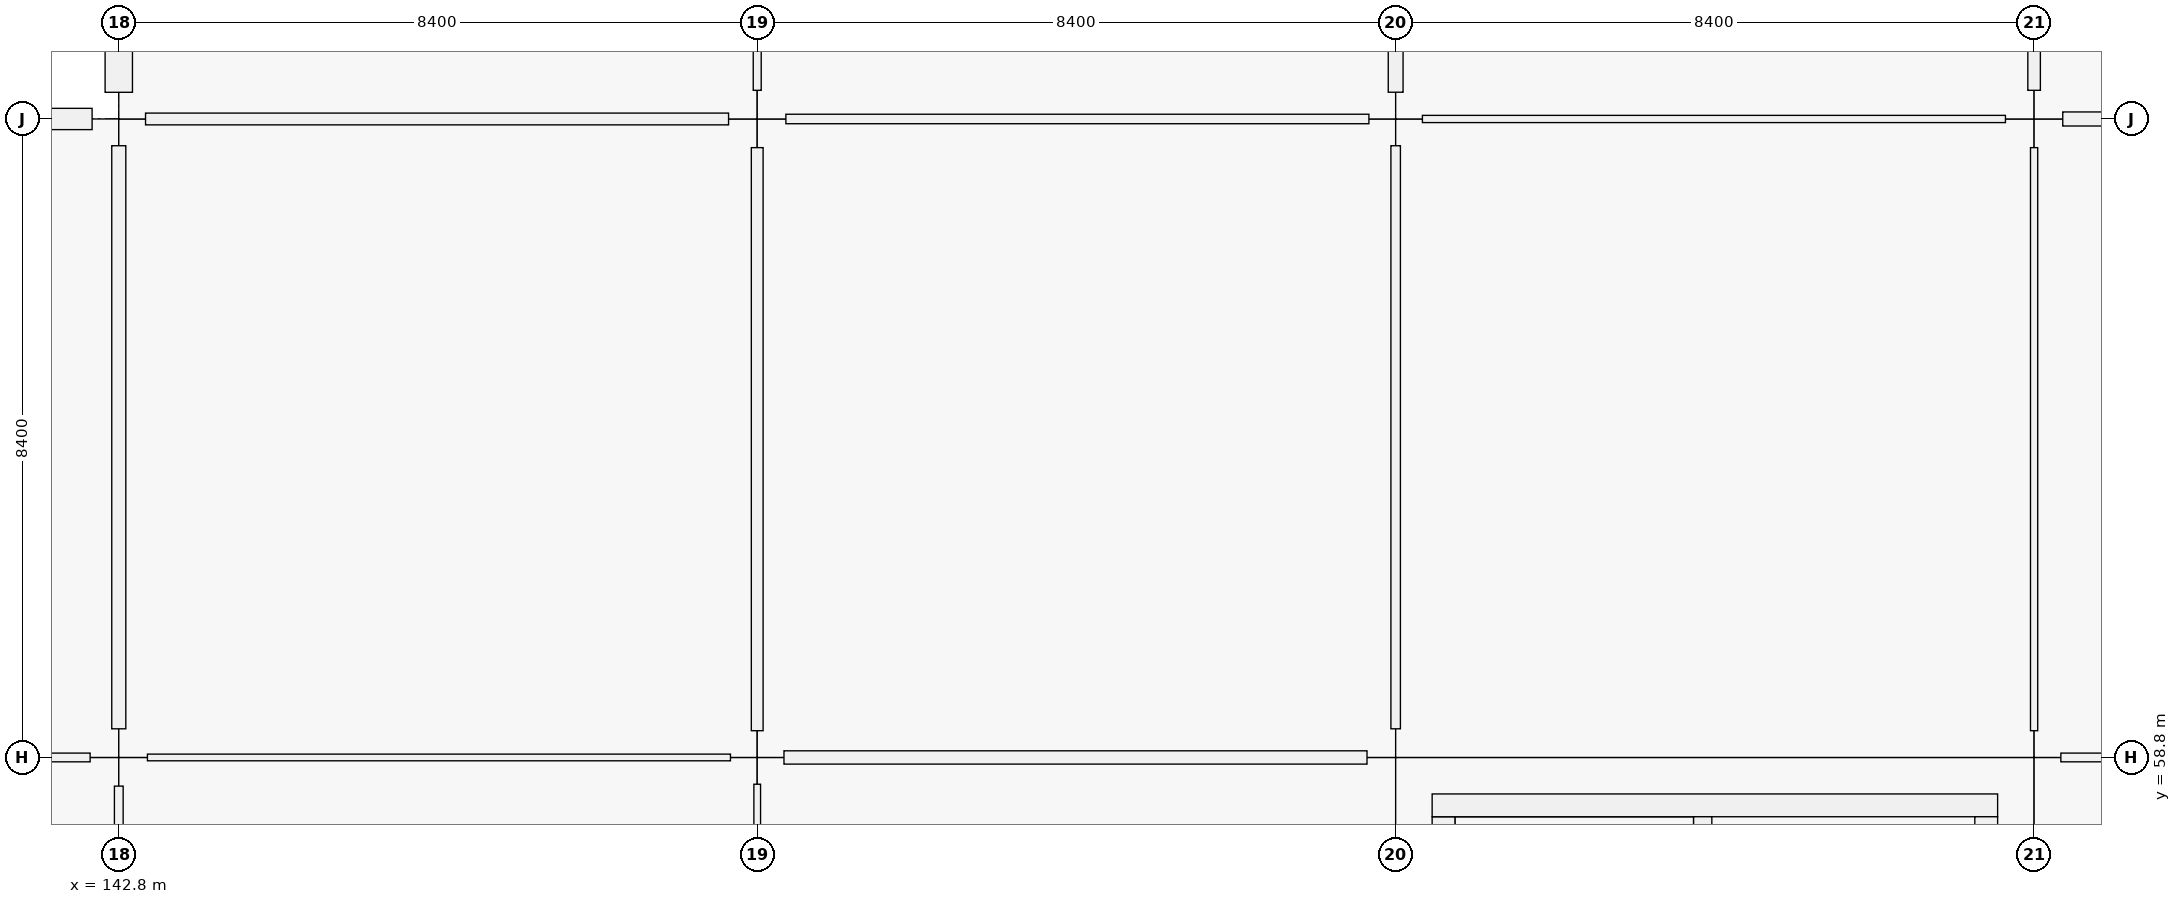
"""IFC4 building model, lengths in metres.
Left out: names, types, materials, properties, quantities, classifications, styles, units other than length and angle.
Written with IfcOpenShell. Run it as: python <this file> out.ifc"""

import sys

from ifc_helpers import new_model, si_unit, direction, frame, frame_2d, origin, origin_2d, place, context, subcontext, project, spatial, rectangle, extrude, element, fill, save


model = new_model("IFC4")
c1 = context("Model", 3, precision=1e-05, world=origin(), true_north=direction((0.0, 1.0)))
c2 = subcontext(c1, "Body", "Model", "MODEL_VIEW")
j1 = project(units=[si_unit("LENGTHUNIT", "METRE"), si_unit("PLANEANGLEUNIT", "RADIAN")], contexts=[c1])
p1 = place(None, origin())
s1 = spatial("IfcSite", under=j1, at=p1, CompositionType="ELEMENT")
p2 = place(p1, origin())
s2 = spatial("IfcBuilding", under=s1, at=p2, CompositionType="ELEMENT")
p3 = place(p2, frame((0.0, 0.0, 5.76)))
s3 = spatial("IfcBuildingStorey", under=s2, at=p3, CompositionType="ELEMENT", Elevation=5.76)
p4 = place(p3, frame((142.8, 58.8, 0.0), z_axis=(0.0, 0.0, 1.0), x_axis=(1.0, 0.0, 0.0)))
e1 = element("IfcColumn", 1, at=p4, inside=s3, PredefinedType="COLUMN", context=c2, shape_type="SweptSolid", body=[
    extrude(rectangle(XDim=0.75, YDim=0.75, at=origin_2d()), origin(), (0.0, 0.0, 1.0), 4.5),
])
for number, where, z_axis, x_axis in (
    (2, (142.8, 67.2, 0.0), (0.0, 0.0, 1.0), (1.0, 0.0, 0.0)),
    (3, (151.2, 58.8, 0.0), (0.0, 0.0, 1.0), (1.0, 0.0, 0.0)),
):
    element("IfcColumn", number, at=place(p3, frame(where, z_axis=z_axis, x_axis=x_axis)), inside=s3, PredefinedType="COLUMN", context=c2, shape_type="SweptSolid", body=[
        extrude(rectangle(XDim=0.7, YDim=0.7, at=origin_2d()), origin(), (0.0, 0.0, 1.0), 4.5),
    ])
for number, where, z_axis, x_axis in (
    (4, (151.2, 67.2, 0.0), (0.0, 0.0, 1.0), (1.0, 0.0, 0.0)),
    (5, (159.6, 58.8, 0.0), (0.0, 0.0, 1.0), (1.0, 0.0, 0.0)),
):
    element("IfcColumn", number, at=place(p3, frame(where, z_axis=z_axis, x_axis=x_axis)), inside=s3, PredefinedType="COLUMN", context=c2, shape_type="SweptSolid", body=[
        extrude(rectangle(XDim=0.75, YDim=0.75, at=origin_2d()), origin(), (0.0, 0.0, 1.0), 4.5),
    ])
for number, where, z_axis, x_axis in (
    (6, (159.6, 67.2, 0.0), (0.0, 0.0, 1.0), (1.0, 0.0, 0.0)),
    (7, (168.0, 58.8, 0.0), (0.0, 0.0, 1.0), (1.0, 0.0, 0.0)),
):
    element("IfcColumn", number, at=place(p3, frame(where, z_axis=z_axis, x_axis=x_axis)), inside=s3, PredefinedType="COLUMN", context=c2, shape_type="SweptSolid", body=[
        extrude(rectangle(XDim=0.7, YDim=0.7, at=origin_2d()), origin(), (0.0, 0.0, 1.0), 4.5),
    ])
p5 = place(p3, frame((168.0, 67.2, 0.0), z_axis=(0.0, 0.0, 1.0), x_axis=(1.0, 0.0, 0.0)))
e8 = element("IfcColumn", 8, at=p5, inside=s3, PredefinedType="COLUMN", context=c2, shape_type="SweptSolid", body=[
    extrude(rectangle(XDim=0.75, YDim=0.75, at=origin_2d()), origin(), (0.0, 0.0, 1.0), 4.5),
])
p6 = place(p3, frame((134.726, 67.2, 0.0), z_axis=(0.0, 0.0, 1.0), x_axis=(1.0, 0.0, 0.0)))
e9 = element("IfcWall", 9, at=p6, inside=s3, PredefinedType="SOLIDWALL", context=c2, shape_type="SweptSolid", body=[
    extrude(rectangle(XDim=7.723, YDim=0.28, at=frame_2d((3.861, 0.0))), origin(), (0.0, 0.0, 1.0), 3.4),
])
p7 = place(p6, frame((2.662, 0.0, 0.9)))
e10 = element("IfcOpeningElement", 10, at=p7, cuts=e9, PredefinedType="OPENING", context=c2, shape_type="SweptSolid", body=[
    extrude(rectangle(XDim=2.4, YDim=2.25, at=frame_2d((1.2, 1.125))), frame((0.0, 0.14, 0.0), z_axis=(0.0, -1.0, 0.0), x_axis=(1.0, 0.0, 0.0)), (0.0, 0.0, 1.0), 0.28),
])
p8 = place(p3, frame((142.8, 67.551, 0.0), z_axis=(0.0, 0.0, 1.0), x_axis=(0.0, 1.0, 0.0)))
e11 = element("IfcWall", 11, at=p8, inside=s3, PredefinedType="SOLIDWALL", context=c2, shape_type="SweptSolid", body=[
    extrude(rectangle(XDim=7.773, YDim=0.36, at=frame_2d((3.886, 0.0))), origin(), (0.0, 0.0, 1.0), 3.4),
])
p9 = place(p8, frame((3.036, 0.0, 0.9)))
e12 = element("IfcOpeningElement", 12, at=p9, cuts=e11, PredefinedType="OPENING", context=c2, shape_type="SweptSolid", body=[
    extrude(rectangle(XDim=1.7, YDim=1.85, at=frame_2d((0.85, 0.925))), frame((0.0, 0.18, 0.0), z_axis=(0.0, -1.0, 0.0), x_axis=(1.0, 0.0, 0.0)), (0.0, 0.0, 1.0), 0.36),
])
p10 = place(p3, frame((160.23, 51.18, 0.0), z_axis=(0.0, 0.0, 1.0), x_axis=(0.0, 1.0, 0.0)))
e13 = element("IfcWall", 13, at=p10, inside=s3, PredefinedType="SHEAR", context=c2, shape_type="SweptSolid", body=[
    extrude(rectangle(XDim=6.84, YDim=0.3, at=frame_2d((3.42, 0.0))), origin(), (0.0, 0.0, 1.0), 4.5),
])
p11 = place(p3, frame((160.08, 58.17, 0.0), z_axis=(0.0, 0.0, 1.0), x_axis=(1.0, 0.0, 0.0)))
e14 = element("IfcWall", 14, at=p11, inside=s3, PredefinedType="SHEAR", context=c2, shape_type="SweptSolid", body=[
    extrude(rectangle(XDim=7.44, YDim=0.3, at=frame_2d((3.72, 0.0))), origin(), (0.0, 0.0, 1.0), 4.5),
])
p12 = place(p3, frame((167.37, 58.02, 0.0), z_axis=(0.0, 0.0, 1.0), x_axis=(0.0, -1.0, 0.0)))
e15 = element("IfcWall", 15, at=p12, inside=s3, PredefinedType="SHEAR", context=c2, shape_type="SweptSolid", body=[
    extrude(rectangle(XDim=6.84, YDim=0.3, at=frame_2d((3.42, 0.0))), origin(), (0.0, 0.0, 1.0), 4.5),
])
p13 = place(p3, frame((163.64, 51.18, 0.0), z_axis=(0.0, 0.0, 1.0), x_axis=(0.0, 1.0, 0.0)))
e16 = element("IfcWall", 16, at=p13, inside=s3, PredefinedType="SHEAR", context=c2, shape_type="SweptSolid", body=[
    extrude(rectangle(XDim=6.84, YDim=0.24, at=frame_2d((3.42, 0.0))), origin(), (0.0, 0.0, 1.0), 4.5),
])
p14 = place(p13, frame((0.12, 0.0, 0.0)))
e17 = element("IfcOpeningElement", 17, at=p14, cuts=e16, PredefinedType="OPENING", context=c2, shape_type="SweptSolid", body=[
    extrude(rectangle(XDim=1.0, YDim=2.15, at=frame_2d((0.5, 1.075))), frame((0.0, 0.12, 0.0), z_axis=(0.0, -1.0, 0.0), x_axis=(1.0, 0.0, 0.0)), (0.0, 0.0, 1.0), 0.24),
])
p15 = place(p3, frame((134.752, 58.8, 0.0), z_axis=(0.0, 0.0, 1.0), x_axis=(1.0, 0.0, 0.0)))
e18 = element("IfcWall", 18, at=p15, inside=s3, PredefinedType="PARTITIONING", context=c2, shape_type="SweptSolid", body=[
    extrude(rectangle(XDim=7.671, YDim=0.115, at=frame_2d((3.835, 0.0))), origin(), (0.0, 0.0, 1.0), 2.4),
])
p16 = place(p15, frame((3.356, 0.0, 0.0)))
e19 = element("IfcOpeningElement", 19, at=p16, cuts=e18, PredefinedType="OPENING", context=c2, shape_type="SweptSolid", body=[
    extrude(rectangle(XDim=0.96, YDim=2.18, at=frame_2d((0.48, 1.09))), frame((0.0, 0.058, 0.0), z_axis=(0.0, -1.0, 0.0), x_axis=(1.0, 0.0, 0.0)), (0.0, 0.0, 1.0), 0.115),
])
p17 = place(p3, frame((143.177, 58.8, 0.0), z_axis=(0.0, 0.0, 1.0), x_axis=(1.0, 0.0, 0.0)))
e20 = element("IfcWall", 20, at=p17, inside=s3, PredefinedType="PARTITIONING", context=c2, shape_type="SweptSolid", body=[
    extrude(rectangle(XDim=7.671, YDim=0.088, at=frame_2d((3.835, 0.0))), origin(), (0.0, 0.0, 1.0), 2.4),
])
p18 = place(p3, frame((143.152, 67.2, 0.0), z_axis=(0.0, 0.0, 1.0), x_axis=(1.0, 0.0, 0.0)))
e21 = element("IfcWall", 21, at=p18, inside=s3, PredefinedType="PARTITIONING", context=c2, shape_type="SweptSolid", body=[
    extrude(rectangle(XDim=7.671, YDim=0.155, at=frame_2d((3.835, 0.0))), origin(), (0.0, 0.0, 1.0), 2.4),
])
p19 = place(p18, frame((3.336, 0.0, 0.0)))
e22 = element("IfcOpeningElement", 22, at=p19, cuts=e21, PredefinedType="OPENING", context=c2, shape_type="SweptSolid", body=[
    extrude(rectangle(XDim=1.0, YDim=2.2, at=frame_2d((0.5, 1.1))), frame((0.0, 0.078, 0.0), z_axis=(0.0, -1.0, 0.0), x_axis=(1.0, 0.0, 0.0)), (0.0, 0.0, 1.0), 0.155),
])
p20 = place(p3, frame((151.552, 58.8, 0.0), z_axis=(0.0, 0.0, 1.0), x_axis=(1.0, 0.0, 0.0)))
e23 = element("IfcWall", 23, at=p20, inside=s3, PredefinedType="PARTITIONING", context=c2, shape_type="SweptSolid", body=[
    extrude(rectangle(XDim=7.671, YDim=0.175, at=frame_2d((3.835, 0.0))), origin(), (0.0, 0.0, 1.0), 2.4),
])
p21 = place(p20, frame((3.376, 0.0, 0.0)))
e24 = element("IfcOpeningElement", 24, at=p21, cuts=e23, PredefinedType="OPENING", context=c2, shape_type="SweptSolid", body=[
    extrude(rectangle(XDim=0.92, YDim=2.15, at=frame_2d((0.46, 1.075))), frame((0.0, 0.087, 0.0), z_axis=(0.0, -1.0, 0.0), x_axis=(1.0, 0.0, 0.0)), (0.0, 0.0, 1.0), 0.175),
])
p22 = place(p3, frame((151.577, 67.2, 0.0), z_axis=(0.0, 0.0, 1.0), x_axis=(1.0, 0.0, 0.0)))
e25 = element("IfcWall", 25, at=p22, inside=s3, PredefinedType="PARTITIONING", context=c2, shape_type="SweptSolid", body=[
    extrude(rectangle(XDim=7.671, YDim=0.125, at=frame_2d((3.835, 0.0))), origin(), (0.0, 0.0, 1.0), 2.4),
])
p23 = place(p22, frame((3.311, 0.0, 0.0)))
e26 = element("IfcOpeningElement", 26, at=p23, cuts=e25, PredefinedType="OPENING", context=c2, shape_type="SweptSolid", body=[
    extrude(rectangle(XDim=1.05, YDim=2.12, at=frame_2d((0.525, 1.06))), frame((0.0, 0.062, 0.0), z_axis=(0.0, -1.0, 0.0), x_axis=(1.0, 0.0, 0.0)), (0.0, 0.0, 1.0), 0.125),
])
p24 = place(p3, frame((159.952, 67.2, 0.0), z_axis=(0.0, 0.0, 1.0), x_axis=(1.0, 0.0, 0.0)))
e27 = element("IfcWall", 27, at=p24, inside=s3, PredefinedType="PARTITIONING", context=c2, shape_type="SweptSolid", body=[
    extrude(rectangle(XDim=7.671, YDim=0.095, at=frame_2d((3.835, 0.0))), origin(), (0.0, 0.0, 1.0), 2.4),
])
p25 = place(p24, frame((3.351, 0.0, 0.0)))
e28 = element("IfcOpeningElement", 28, at=p25, cuts=e27, PredefinedType="OPENING", context=c2, shape_type="SweptSolid", body=[
    extrude(rectangle(XDim=0.97, YDim=2.12, at=frame_2d((0.485, 1.06))), frame((0.0, 0.047, 0.0), z_axis=(0.0, -1.0, 0.0), x_axis=(1.0, 0.0, 0.0)), (0.0, 0.0, 1.0), 0.095),
])
p26 = place(p3, frame((168.352, 58.8, 0.0), z_axis=(0.0, 0.0, 1.0), x_axis=(1.0, 0.0, 0.0)))
e29 = element("IfcWall", 29, at=p26, inside=s3, PredefinedType="PARTITIONING", context=c2, shape_type="SweptSolid", body=[
    extrude(rectangle(XDim=7.771, YDim=0.115, at=frame_2d((3.885, 0.0))), origin(), (0.0, 0.0, 1.0), 2.4),
])
p27 = place(p26, frame((3.385, 0.0, 0.0)))
e30 = element("IfcOpeningElement", 30, at=p27, cuts=e29, PredefinedType="OPENING", context=c2, shape_type="SweptSolid", body=[
    extrude(rectangle(XDim=1.0, YDim=2.2, at=frame_2d((0.5, 1.1))), frame((0.0, 0.058, 0.0), z_axis=(0.0, -1.0, 0.0), x_axis=(1.0, 0.0, 0.0)), (0.0, 0.0, 1.0), 0.115),
])
p28 = place(p3, frame((168.377, 67.2, 0.0), z_axis=(0.0, 0.0, 1.0), x_axis=(1.0, 0.0, 0.0)))
e31 = element("IfcWall", 31, at=p28, inside=s3, PredefinedType="PARTITIONING", context=c2, shape_type="SweptSolid", body=[
    extrude(rectangle(XDim=7.746, YDim=0.185, at=frame_2d((3.873, 0.0))), origin(), (0.0, 0.0, 1.0), 2.4),
])
p29 = place(p28, frame((3.383, 0.0, 0.0)))
e32 = element("IfcOpeningElement", 32, at=p29, cuts=e31, PredefinedType="OPENING", context=c2, shape_type="SweptSolid", body=[
    extrude(rectangle(XDim=0.98, YDim=2.18, at=frame_2d((0.49, 1.09))), frame((0.0, 0.093, 0.0), z_axis=(0.0, -1.0, 0.0), x_axis=(1.0, 0.0, 0.0)), (0.0, 0.0, 1.0), 0.185),
])
p30 = place(p3, frame((142.8, 50.752, 0.0), z_axis=(0.0, 0.0, 1.0), x_axis=(0.0, 1.0, 0.0)))
e33 = element("IfcWall", 33, at=p30, inside=s3, PredefinedType="PARTITIONING", context=c2, shape_type="SweptSolid", body=[
    extrude(rectangle(XDim=7.671, YDim=0.115, at=frame_2d((3.835, 0.0))), origin(), (0.0, 0.0, 1.0), 2.4),
])
p31 = place(p30, frame((0.623, 0.0, 0.0)))
e34 = element("IfcOpeningElement", 34, at=p31, cuts=e33, PredefinedType="OPENING", context=c2, shape_type="SweptSolid", body=[
    extrude(rectangle(XDim=0.98, YDim=2.08, at=frame_2d((0.49, 1.04))), frame((0.0, 0.058, 0.0), z_axis=(0.0, -1.0, 0.0), x_axis=(1.0, 0.0, 0.0)), (0.0, 0.0, 1.0), 0.115),
])
p32 = place(p30, frame((4.563, 0.0, 0.0)))
e35 = element("IfcOpeningElement", 35, at=p32, cuts=e33, PredefinedType="OPENING", context=c2, shape_type="SweptSolid", body=[
    extrude(rectangle(XDim=0.94, YDim=2.08, at=frame_2d((0.47, 1.04))), frame((0.0, 0.058, 0.0), z_axis=(0.0, -1.0, 0.0), x_axis=(1.0, 0.0, 0.0)), (0.0, 0.0, 1.0), 0.115),
])
p33 = place(p3, frame((142.8, 59.177, 0.0), z_axis=(0.0, 0.0, 1.0), x_axis=(0.0, 1.0, 0.0)))
e36 = element("IfcWall", 36, at=p33, inside=s3, PredefinedType="PARTITIONING", context=c2, shape_type="SweptSolid", body=[
    extrude(rectangle(XDim=7.671, YDim=0.185, at=frame_2d((3.835, 0.0))), origin(), (0.0, 0.0, 1.0), 2.4),
])
p34 = place(p33, frame((3.376, 0.0, 0.0)))
e37 = element("IfcOpeningElement", 37, at=p34, cuts=e36, PredefinedType="OPENING", context=c2, shape_type="SweptSolid", body=[
    extrude(rectangle(XDim=0.92, YDim=2.15, at=frame_2d((0.46, 1.075))), frame((0.0, 0.093, 0.0), z_axis=(0.0, -1.0, 0.0), x_axis=(1.0, 0.0, 0.0)), (0.0, 0.0, 1.0), 0.185),
])
p35 = place(p3, frame((151.2, 50.777, 0.0), z_axis=(0.0, 0.0, 1.0), x_axis=(0.0, 1.0, 0.0)))
e38 = element("IfcWall", 38, at=p35, inside=s3, PredefinedType="PARTITIONING", context=c2, shape_type="SweptSolid", body=[
    extrude(rectangle(XDim=7.671, YDim=0.088, at=frame_2d((3.835, 0.0))), origin(), (0.0, 0.0, 1.0), 2.4),
])
p36 = place(p3, frame((151.2, 59.152, 0.0), z_axis=(0.0, 0.0, 1.0), x_axis=(0.0, 1.0, 0.0)))
e39 = element("IfcWall", 39, at=p36, inside=s3, PredefinedType="PARTITIONING", context=c2, shape_type="SweptSolid", body=[
    extrude(rectangle(XDim=7.671, YDim=0.155, at=frame_2d((3.835, 0.0))), origin(), (0.0, 0.0, 1.0), 2.4),
])
p37 = place(p36, frame((3.331, 0.0, 0.0)))
e40 = element("IfcOpeningElement", 40, at=p37, cuts=e39, PredefinedType="OPENING", context=c2, shape_type="SweptSolid", body=[
    extrude(rectangle(XDim=1.01, YDim=2.12, at=frame_2d((0.505, 1.06))), frame((0.0, 0.078, 0.0), z_axis=(0.0, -1.0, 0.0), x_axis=(1.0, 0.0, 0.0)), (0.0, 0.0, 1.0), 0.155),
])
p38 = place(p3, frame((151.2, 67.577, 0.0), z_axis=(0.0, 0.0, 1.0), x_axis=(0.0, 1.0, 0.0)))
e41 = element("IfcWall", 41, at=p38, inside=s3, PredefinedType="PARTITIONING", context=c2, shape_type="SweptSolid", body=[
    extrude(rectangle(XDim=7.746, YDim=0.105, at=frame_2d((3.873, 0.0))), origin(), (0.0, 0.0, 1.0), 2.4),
])
p39 = place(p38, frame((3.388, 0.0, 0.0)))
e42 = element("IfcOpeningElement", 42, at=p39, cuts=e41, PredefinedType="OPENING", context=c2, shape_type="SweptSolid", body=[
    extrude(rectangle(XDim=0.97, YDim=2.12, at=frame_2d((0.485, 1.06))), frame((0.0, 0.052, 0.0), z_axis=(0.0, -1.0, 0.0), x_axis=(1.0, 0.0, 0.0)), (0.0, 0.0, 1.0), 0.105),
])
p40 = place(p3, frame((159.6, 59.177, 0.0), z_axis=(0.0, 0.0, 1.0), x_axis=(0.0, 1.0, 0.0)))
e43 = element("IfcWall", 43, at=p40, inside=s3, PredefinedType="PARTITIONING", context=c2, shape_type="SweptSolid", body=[
    extrude(rectangle(XDim=7.671, YDim=0.125, at=frame_2d((3.835, 0.0))), origin(), (0.0, 0.0, 1.0), 2.4),
])
p41 = place(p40, frame((3.331, 0.0, 0.0)))
e44 = element("IfcOpeningElement", 44, at=p41, cuts=e43, PredefinedType="OPENING", context=c2, shape_type="SweptSolid", body=[
    extrude(rectangle(XDim=1.01, YDim=2.12, at=frame_2d((0.505, 1.06))), frame((0.0, 0.062, 0.0), z_axis=(0.0, -1.0, 0.0), x_axis=(1.0, 0.0, 0.0)), (0.0, 0.0, 1.0), 0.125),
])
p42 = place(p3, frame((159.6, 67.552, 0.0), z_axis=(0.0, 0.0, 1.0), x_axis=(0.0, 1.0, 0.0)))
e45 = element("IfcWall", 45, at=p42, inside=s3, PredefinedType="PARTITIONING", context=c2, shape_type="SweptSolid", body=[
    extrude(rectangle(XDim=7.771, YDim=0.195, at=frame_2d((3.885, 0.0))), origin(), (0.0, 0.0, 1.0), 2.4),
])
p43 = place(p42, frame((3.365, 0.0, 0.0)))
e46 = element("IfcOpeningElement", 46, at=p43, cuts=e45, PredefinedType="OPENING", context=c2, shape_type="SweptSolid", body=[
    extrude(rectangle(XDim=1.04, YDim=2.2, at=frame_2d((0.52, 1.1))), frame((0.0, 0.098, 0.0), z_axis=(0.0, -1.0, 0.0), x_axis=(1.0, 0.0, 0.0)), (0.0, 0.0, 1.0), 0.195),
])
p44 = place(p3, frame((168.0, 59.152, 0.0), z_axis=(0.0, 0.0, 1.0), x_axis=(0.0, 1.0, 0.0)))
e47 = element("IfcWall", 47, at=p44, inside=s3, PredefinedType="PARTITIONING", context=c2, shape_type="SweptSolid", body=[
    extrude(rectangle(XDim=7.671, YDim=0.095, at=frame_2d((3.835, 0.0))), origin(), (0.0, 0.0, 1.0), 2.4),
])
p45 = place(p44, frame((3.365, 0.0, 0.0)))
e48 = element("IfcOpeningElement", 48, at=p45, cuts=e47, PredefinedType="OPENING", context=c2, shape_type="SweptSolid", body=[
    extrude(rectangle(XDim=0.94, YDim=2.15, at=frame_2d((0.47, 1.075))), frame((0.0, 0.047, 0.0), z_axis=(0.0, -1.0, 0.0), x_axis=(1.0, 0.0, 0.0)), (0.0, 0.0, 1.0), 0.095),
])
p46 = place(p3, frame((168.0, 67.577, 0.0), z_axis=(0.0, 0.0, 1.0), x_axis=(0.0, 1.0, 0.0)))
e49 = element("IfcWall", 49, at=p46, inside=s3, PredefinedType="PARTITIONING", context=c2, shape_type="SweptSolid", body=[
    extrude(rectangle(XDim=7.746, YDim=0.165, at=frame_2d((3.873, 0.0))), origin(), (0.0, 0.0, 1.0), 2.4),
])
p47 = place(p46, frame((3.413, 0.0, 0.0)))
e50 = element("IfcOpeningElement", 50, at=p47, cuts=e49, PredefinedType="OPENING", context=c2, shape_type="SweptSolid", body=[
    extrude(rectangle(XDim=0.92, YDim=2.15, at=frame_2d((0.46, 1.075))), frame((0.0, 0.083, 0.0), z_axis=(0.0, -1.0, 0.0), x_axis=(1.0, 0.0, 0.0)), (0.0, 0.0, 1.0), 0.165),
])
p48 = place(p19, origin())
e51 = element("IfcDoor", 51, at=p48, inside=s3, OperationType="SINGLE_SWING_RIGHT", PredefinedType="DOOR", context=c2, shape_type="SweptSolid", body=[
    extrude(rectangle(XDim=1.0, YDim=2.2, at=frame_2d((0.5, 1.1))), frame((0.0, 0.025, 0.0), z_axis=(0.0, -1.0, 0.0), x_axis=(1.0, 0.0, 0.0)), (0.0, 0.0, 1.0), 0.05),
])
fill(e22, e51)
p49 = place(p21, origin())
e52 = element("IfcDoor", 52, at=p49, inside=s3, OperationType="SINGLE_SWING_RIGHT", PredefinedType="DOOR", context=c2, shape_type="SweptSolid", body=[
    extrude(rectangle(XDim=0.92, YDim=2.15, at=frame_2d((0.46, 1.075))), frame((0.0, 0.025, 0.0), z_axis=(0.0, -1.0, 0.0), x_axis=(1.0, 0.0, 0.0)), (0.0, 0.0, 1.0), 0.05),
])
fill(e24, e52)
p50 = place(p23, origin())
e53 = element("IfcDoor", 53, at=p50, inside=s3, OperationType="SINGLE_SWING_LEFT", PredefinedType="DOOR", context=c2, shape_type="SweptSolid", body=[
    extrude(rectangle(XDim=1.05, YDim=2.12, at=frame_2d((0.525, 1.06))), frame((0.0, 0.025, 0.0), z_axis=(0.0, -1.0, 0.0), x_axis=(1.0, 0.0, 0.0)), (0.0, 0.0, 1.0), 0.05),
])
fill(e26, e53)
p51 = place(p25, origin())
e54 = element("IfcDoor", 54, at=p51, inside=s3, OperationType="SINGLE_SWING_LEFT", PredefinedType="DOOR", context=c2, shape_type="SweptSolid", body=[
    extrude(rectangle(XDim=0.97, YDim=2.12, at=frame_2d((0.485, 1.06))), frame((0.0, 0.025, 0.0), z_axis=(0.0, -1.0, 0.0), x_axis=(1.0, 0.0, 0.0)), (0.0, 0.0, 1.0), 0.05),
])
fill(e28, e54)
p52 = place(p34, origin())
e55 = element("IfcDoor", 55, at=p52, inside=s3, OperationType="SINGLE_SWING_RIGHT", PredefinedType="DOOR", context=c2, shape_type="SweptSolid", body=[
    extrude(rectangle(XDim=0.92, YDim=2.15, at=frame_2d((0.46, 1.075))), frame((0.0, 0.025, 0.0), z_axis=(0.0, -1.0, 0.0), x_axis=(1.0, 0.0, 0.0)), (0.0, 0.0, 1.0), 0.05),
])
fill(e37, e55)
p53 = place(p41, origin())
e56 = element("IfcDoor", 56, at=p53, inside=s3, OperationType="SINGLE_SWING_RIGHT", PredefinedType="DOOR", context=c2, shape_type="SweptSolid", body=[
    extrude(rectangle(XDim=1.01, YDim=2.12, at=frame_2d((0.505, 1.06))), frame((0.0, 0.025, 0.0), z_axis=(0.0, -1.0, 0.0), x_axis=(1.0, 0.0, 0.0)), (0.0, 0.0, 1.0), 0.05),
])
fill(e44, e56)
p54 = place(p37, origin())
e57 = element("IfcDoor", 57, at=p54, inside=s3, OperationType="SINGLE_SWING_RIGHT", PredefinedType="DOOR", context=c2, shape_type="SweptSolid", body=[
    extrude(rectangle(XDim=1.01, YDim=2.12, at=frame_2d((0.505, 1.06))), frame((0.0, 0.025, 0.0), z_axis=(0.0, -1.0, 0.0), x_axis=(1.0, 0.0, 0.0)), (0.0, 0.0, 1.0), 0.05),
])
fill(e40, e57)
p55 = place(p45, origin())
e58 = element("IfcDoor", 58, at=p55, inside=s3, OperationType="SINGLE_SWING_RIGHT", PredefinedType="DOOR", context=c2, shape_type="SweptSolid", body=[
    extrude(rectangle(XDim=0.94, YDim=2.15, at=frame_2d((0.47, 1.075))), frame((0.0, 0.025, 0.0), z_axis=(0.0, -1.0, 0.0), x_axis=(1.0, 0.0, 0.0)), (0.0, 0.0, 1.0), 0.05),
])
fill(e48, e58)
save(model, sys.argv[1])
